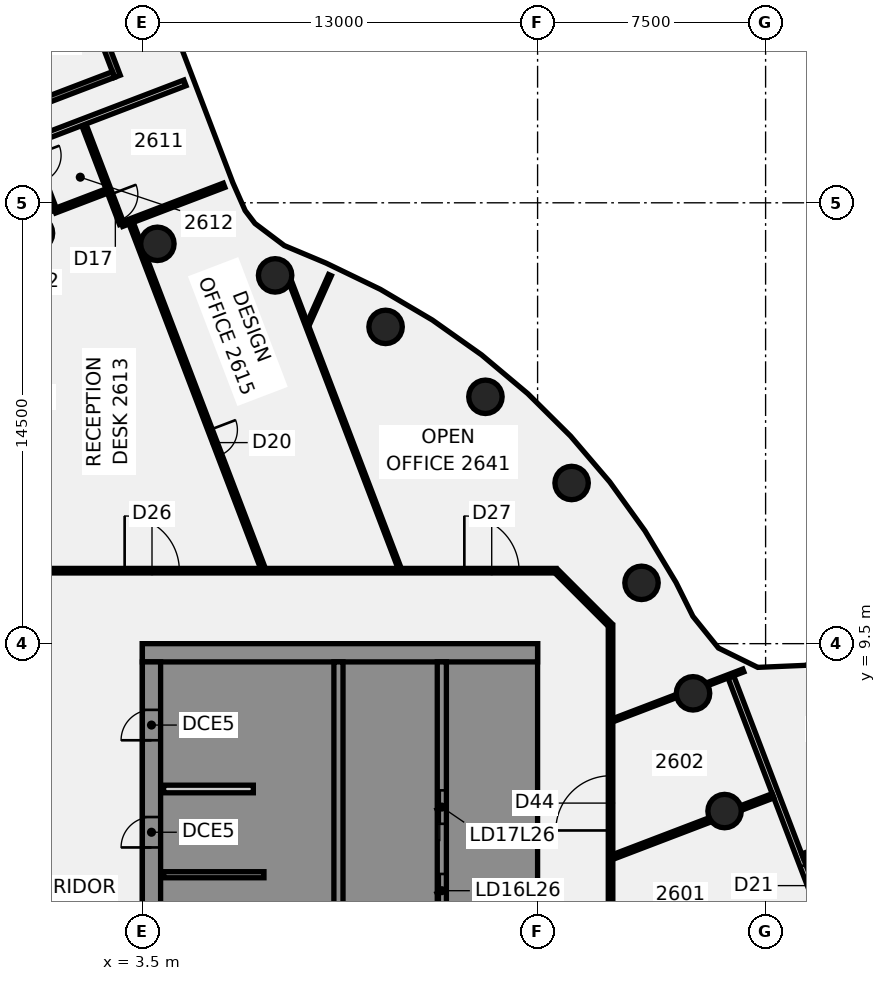
"""IFC4 building model, lengths in metres.
Left out: names, types, materials, properties, quantities, classifications, styles, units other than length and angle.
Written with IfcOpenShell. Run it as: python <this file> out.ifc"""

import sys

from ifc_helpers import new_model, si_unit, direction, frame, frame_2d, origin, origin_2d, place, context, subcontext, project, spatial, polyline, rectangle, circle, outline, extrude, element, fill, save


model = new_model("IFC4")
c1 = context("Model", 3, precision=1e-05, world=origin(), true_north=direction((0.0, 1.0)))
c2 = subcontext(c1, "Body", "Model", "MODEL_VIEW")
j1 = project(units=[si_unit("LENGTHUNIT", "METRE"), si_unit("PLANEANGLEUNIT", "RADIAN")], contexts=[c1])
p1 = place(None, origin())
s1 = spatial("IfcSite", under=j1, at=p1, CompositionType="ELEMENT")
p2 = place(p1, origin())
s2 = spatial("IfcBuilding", under=s1, at=p2, CompositionType="ELEMENT")
p3 = place(p2, frame((0.0, 0.0, 109.75)))
s3 = spatial("IfcBuildingStorey", under=s2, at=p3, CompositionType="ELEMENT", Elevation=109.75)
for number, where, z_axis, x_axis in (
    (1, (22.651, 3.994, -0.14), (0.0, 0.0, 1.0), (1.0, 0.0, 0.0)),
    (2, (21.613, 7.866, -0.14), (0.0, 0.0, 1.0), (1.0, 0.0, 0.0)),
    (3, (19.919, 11.5, -0.14), (0.0, 0.0, 1.0), (1.0, 0.0, 0.0)),
    (4, (17.619, 14.784, -0.14), (0.0, 0.0, 1.0), (1.0, 0.0, 0.0)),
    (5, (14.784, 17.619, -0.14), (0.0, 0.0, 1.0), (1.0, 0.0, 0.0)),
    (6, (11.5, 19.919, -0.14), (0.0, 0.0, 1.0), (1.0, 0.0, 0.0)),
    (7, (7.866, 21.613, -0.14), (0.0, 0.0, 1.0), (1.0, 0.0, 0.0)),
    (8, (3.994, 22.651, -0.14), (0.0, 0.0, 1.0), (1.0, 0.0, 0.0)),
    (9, (0.0, 23.0, -0.14), (0.0, 0.0, 1.0), (1.0, 0.0, 0.0)),
):
    element("IfcColumn", number, at=place(p3, frame(where, z_axis=z_axis, x_axis=x_axis)), inside=s3, PredefinedType="COLUMN", context=c2, shape_type="SweptSolid", body=[
        extrude(circle(Radius=0.55, at=origin_2d()), origin(), (0.0, 0.0, 1.0), 3.75),
    ])
p4 = place(p3, frame((-0.576, 26.875, 0.0), z_axis=(0.0, 0.0, 1.0), x_axis=(0.356621516602, -0.934248946425, 0.0)))
e10 = element("IfcWall", 10, at=p4, inside=s3, PredefinedType="PARTITIONING", context=c2, shape_type="SweptSolid", body=[
    extrude(rectangle(XDim=3.339, YDim=0.15, at=frame_2d((1.67, 0.0))), origin(), (0.0, 0.0, 1.0), 3.01),
])
p5 = place(p4, frame((1.409, 0.0, 0.0)))
e11 = element("IfcOpeningElement", 11, at=p5, cuts=e10, PredefinedType="OPENING", context=c2, shape_type="SweptSolid", body=[
    extrude(rectangle(XDim=0.9, YDim=2.1, at=frame_2d((0.45, 1.05))), frame((0.0, 0.085, 0.0), z_axis=(0.0, -1.0, 0.0), x_axis=(1.0, 0.0, 0.0)), (0.0, 0.0, 1.0), 0.17),
])
p6 = place(p3, frame((1.577, 26.562, 0.0), z_axis=(0.0, 0.0, 1.0), x_axis=(0.356707132487, -0.934216260634, 0.0)))
e12 = element("IfcWall", 12, at=p6, inside=s3, PredefinedType="PARTITIONING", context=c2, shape_type="SweptSolid", body=[
    extrude(rectangle(XDim=3.48, YDim=0.15, at=frame_2d((1.74, 0.0))), origin(), (0.0, 0.0, 1.0), 3.01),
])
p7 = place(p6, frame((2.45, 0.0, 0.0)))
e13 = element("IfcOpeningElement", 13, at=p7, cuts=e12, PredefinedType="OPENING", context=c2, shape_type="SweptSolid", body=[
    extrude(rectangle(XDim=0.9, YDim=2.1, at=frame_2d((0.45, 1.05))), frame((0.0, 0.085, 0.0), z_axis=(0.0, -1.0, 0.0), x_axis=(1.0, 0.0, 0.0)), (0.0, 0.0, 1.0), 0.17),
])
p8 = place(p3, frame((3.134, 23.325, 0.0), z_axis=(0.0, 0.0, 1.0), x_axis=(0.356638375278, -0.934242510957, 0.0)))
e14 = element("IfcWall", 14, at=p8, inside=s3, PredefinedType="PARTITIONING", context=c2, shape_type="SweptSolid", body=[
    extrude(rectangle(XDim=12.139, YDim=0.15, at=frame_2d((6.07, 0.0))), origin(), (0.0, 0.0, 1.0), 3.01),
])
p9 = place(p8, frame((7.27, 0.0, 0.0)))
e15 = element("IfcOpeningElement", 15, at=p9, cuts=e14, PredefinedType="OPENING", context=c2, shape_type="SweptSolid", body=[
    extrude(rectangle(XDim=0.9, YDim=2.1, at=frame_2d((0.45, 1.05))), frame((0.0, 0.085, 0.0), z_axis=(0.0, -1.0, 0.0), x_axis=(1.0, 0.0, 0.0)), (0.0, 0.0, 1.0), 0.17),
])
p10 = place(p3, frame((8.367, 21.392, 0.0), z_axis=(0.0, 0.0, 1.0), x_axis=(0.356653909122, -0.934236580909, 0.0)))
e16 = element("IfcWall", 16, at=p10, inside=s3, PredefinedType="PARTITIONING", context=c2, shape_type="SweptSolid", body=[
    extrude(rectangle(XDim=10.08, YDim=0.1, at=frame_2d((5.04, 0.0))), origin(), (0.0, 0.0, 1.0), 3.01),
])
p11 = place(p3, frame((22.857, 8.408, 0.0), z_axis=(0.0, 0.0, 1.0), x_axis=(0.356739087103, -0.934204058936, 0.0)))
e17 = element("IfcWall", 17, at=p11, inside=s3, PredefinedType="PARTITIONING", context=c2, shape_type="SweptSolid", body=[
    extrude(rectangle(XDim=14.249, YDim=0.2, at=frame_2d((7.124, 0.0))), origin(), (0.0, 0.0, 1.0), 3.01),
])
p12 = place(p11, frame((6.65, 0.0, 0.0)))
e18 = element("IfcOpeningElement", 18, at=p12, cuts=e17, PredefinedType="OPENING", context=c2, shape_type="SweptSolid", body=[
    extrude(rectangle(XDim=1.4, YDim=2.1, at=frame_2d((0.7, 1.05))), frame((0.0, 0.11, 0.0), z_axis=(0.0, -1.0, 0.0), x_axis=(1.0, 0.0, 0.0)), (0.0, 0.0, 1.0), 0.22),
])
p13 = place(p3, frame((17.128, 11.872, 0.0), z_axis=(0.0, 0.0, 1.0), x_axis=(0.707106781187, -0.707106781187, 0.0)))
e19 = element("IfcWall", 19, at=p13, inside=s3, PredefinedType="PARTITIONING", context=c2, shape_type="SweptSolid", body=[
    extrude(rectangle(XDim=2.465, YDim=0.15, at=frame_2d((1.232, 0.0))), origin(), (0.0, 0.0, 1.0), 3.01),
])
p14 = place(p3, frame((-17.065, 11.9, 0.0), z_axis=(0.0, 0.0, 1.0), x_axis=(1.0, 0.0, 0.0)))
e20 = element("IfcWall", 20, at=p14, inside=s3, PredefinedType="PARTITIONING", context=c2, shape_type="SweptSolid", body=[
    extrude(rectangle(XDim=34.165, YDim=0.15, at=frame_2d((17.083, 0.0))), origin(), (0.0, 0.0, 1.0), 3.01),
])
p15 = place(p14, frame((19.982, 0.0, 0.0)))
e21 = element("IfcOpeningElement", 21, at=p15, cuts=e20, PredefinedType="OPENING", context=c2, shape_type="SweptSolid", body=[
    extrude(rectangle(XDim=1.8, YDim=2.1, at=frame_2d((0.9, 1.05))), frame((0.0, 0.085, 0.0), z_axis=(0.0, -1.0, 0.0), x_axis=(1.0, 0.0, 0.0)), (0.0, 0.0, 1.0), 0.17),
])
p16 = place(p14, frame((31.156, 0.0, 0.0)))
e22 = element("IfcOpeningElement", 22, at=p16, cuts=e20, PredefinedType="OPENING", context=c2, shape_type="SweptSolid", body=[
    extrude(rectangle(XDim=1.8, YDim=2.1, at=frame_2d((0.9, 1.05))), frame((0.0, 0.085, 0.0), z_axis=(0.0, -1.0, 0.0), x_axis=(1.0, 0.0, 0.0)), (0.0, 0.0, 1.0), 0.17),
])
p17 = place(p14, frame((5.515, 0.0, 0.0)))
e23 = element("IfcOpeningElement", 23, at=p17, cuts=e20, PredefinedType="OPENING", context=c2, shape_type="SweptSolid", body=[
    extrude(rectangle(XDim=1.8, YDim=2.1, at=frame_2d((0.9, 1.05))), frame((0.0, 0.085, 0.0), z_axis=(0.0, -1.0, 0.0), x_axis=(1.0, 0.0, 0.0)), (0.0, 0.0, 1.0), 0.17),
])
p18 = place(p3, frame((-8.408, 22.857, 0.0), z_axis=(0.0, 0.0, 1.0), x_axis=(0.934093855928, 0.357027545601, 0.0)))
e24 = element("IfcWall", 24, at=p18, inside=s3, PredefinedType="PARTITIONING", context=c2, shape_type="SweptSolid", body=[
    extrude(rectangle(XDim=14.249, YDim=0.2, at=frame_2d((7.124, 0.0))), origin(), (0.0, 0.0, 1.0), 3.01),
])
p19 = place(p18, frame((6.65, 0.0, 0.0)))
e25 = element("IfcOpeningElement", 25, at=p19, cuts=e24, PredefinedType="OPENING", context=c2, shape_type="SweptSolid", body=[
    extrude(rectangle(XDim=1.4, YDim=2.1, at=frame_2d((0.7, 1.05))), frame((0.0, 0.11, 0.0), z_axis=(0.0, -1.0, 0.0), x_axis=(1.0, 0.0, 0.0)), (0.0, 0.0, 1.0), 0.22),
])
p20 = place(p3, frame((2.825, 23.292, 0.0), z_axis=(0.0, 0.0, 1.0), x_axis=(0.93426400511, 0.356582064546, 0.0)))
e26 = element("IfcWall", 26, at=p20, inside=s3, PredefinedType="PARTITIONING", context=c2, shape_type="SweptSolid", body=[
    extrude(rectangle(XDim=3.599, YDim=0.15, at=frame_2d((1.799, 0.0))), origin(), (0.0, 0.0, 1.0), 3.01),
])
p21 = place(p3, frame((0.622, 23.735, 0.0), z_axis=(0.0, 0.0, 1.0), x_axis=(0.934290504137, 0.356512627939, 0.0)))
e27 = element("IfcWall", 27, at=p21, inside=s3, PredefinedType="PARTITIONING", context=c2, shape_type="SweptSolid", body=[
    extrude(rectangle(XDim=1.825, YDim=0.15, at=frame_2d((0.913, 0.0))), origin(), (0.0, 0.0, 1.0), 3.01),
])
p22 = place(p3, frame((18.984, 2.488, 0.0), z_axis=(0.0, 0.0, 1.0), x_axis=(0.934220119269, 0.356697026555, 0.0)))
e28 = element("IfcWall", 28, at=p22, inside=s3, PredefinedType="PARTITIONING", context=c2, shape_type="SweptSolid", body=[
    extrude(rectangle(XDim=3.414, YDim=0.15, at=frame_2d((1.707, 0.0))), origin(), (0.0, 0.0, 1.0), 3.01),
])
p23 = place(p3, frame((23.184, 4.092, 0.0), z_axis=(0.0, 0.0, 1.0), x_axis=(0.934197512786, 0.356756229243, 0.0)))
e29 = element("IfcWall", 29, at=p23, inside=s3, PredefinedType="PARTITIONING", context=c2, shape_type="SweptSolid", body=[
    extrude(rectangle(XDim=1.134, YDim=0.15, at=frame_2d((0.567, 0.0))), origin(), (0.0, 0.0, 1.0), 3.01),
])
p24 = place(p3, frame((18.975, 6.98, 0.0), z_axis=(0.0, 0.0, 1.0), x_axis=(0.934310454928, 0.356460339748, 0.0)))
e30 = element("IfcWall", 30, at=p24, inside=s3, PredefinedType="PARTITIONING", context=c2, shape_type="SweptSolid", body=[
    extrude(rectangle(XDim=2.249, YDim=0.1, at=frame_2d((1.124, 0.0))), origin(), (0.0, 0.0, 1.0), 3.01),
])
p25 = place(p3, frame((22.079, 8.165, 0.0), z_axis=(0.0, 0.0, 1.0), x_axis=(0.9342532872, 0.356610144775, 0.0)))
e31 = element("IfcWall", 31, at=p25, inside=s3, PredefinedType="PARTITIONING", context=c2, shape_type="SweptSolid", body=[
    extrude(rectangle(XDim=1.271, YDim=0.1, at=frame_2d((0.636, 0.0))), origin(), (0.0, 0.0, 1.0), 3.01),
])
p26 = place(p3, frame((25.22, 2.513, 0.0), z_axis=(0.0, 0.0, 1.0), x_axis=(0.934230964204, 0.356668621445, 0.0)))
e32 = element("IfcWall", 32, at=p26, inside=s3, PredefinedType="PARTITIONING", context=c2, shape_type="SweptSolid", body=[
    extrude(rectangle(XDim=8.82, YDim=0.15, at=frame_2d((4.41, 0.0))), origin(), (0.0, 0.0, 1.0), 3.01),
])
p27 = place(p26, frame((6.045, 0.0, 0.0)))
e33 = element("IfcOpeningElement", 33, at=p27, cuts=e32, PredefinedType="OPENING", context=c2, shape_type="SweptSolid", body=[
    extrude(rectangle(XDim=1.8, YDim=2.1, at=frame_2d((0.9, 1.05))), frame((0.0, 0.085, 0.0), z_axis=(0.0, -1.0, 0.0), x_axis=(1.0, 0.0, 0.0)), (0.0, 0.0, 1.0), 0.17),
])
p28 = place(p26, frame((0.945, 0.0, 0.0)))
e34 = element("IfcOpeningElement", 34, at=p28, cuts=e32, PredefinedType="OPENING", context=c2, shape_type="SweptSolid", body=[
    extrude(rectangle(XDim=1.8, YDim=2.1, at=frame_2d((0.9, 1.05))), frame((0.0, 0.085, 0.0), z_axis=(0.0, -1.0, 0.0), x_axis=(1.0, 0.0, 0.0)), (0.0, 0.0, 1.0), 0.17),
])
p29 = place(p3, frame((8.963, 20.036, 0.0), z_axis=(0.0, 0.0, 1.0), x_axis=(0.408251922196, 0.912869305007, 0.0)))
e35 = element("IfcWall", 35, at=p29, inside=s3, PredefinedType="PARTITIONING", context=c2, shape_type="SweptSolid", body=[
    extrude(rectangle(XDim=1.735, YDim=0.1, at=frame_2d((0.868, 0.0))), origin(), (0.0, 0.0, 1.0), 3.01),
])
p30 = place(p3, frame((18.9, -10.1, 0.0), z_axis=(0.0, 0.0, 1.0), x_axis=(0.0, 1.0, 0.0)))
e36 = element("IfcWall", 36, at=p30, inside=s3, PredefinedType="PARTITIONING", context=c2, shape_type="SweptSolid", body=[
    extrude(rectangle(XDim=20.2, YDim=0.15, at=frame_2d((10.1, 0.0))), origin(), (0.0, 0.0, 1.0), 3.01),
])
p31 = place(p30, frame((8.877, 0.0, 0.0)))
e37 = element("IfcOpeningElement", 37, at=p31, cuts=e36, PredefinedType="OPENING", context=c2, shape_type="SweptSolid", body=[
    extrude(rectangle(XDim=1.8, YDim=2.1, at=frame_2d((0.9, 1.05))), frame((0.0, 0.085, 0.0), z_axis=(0.0, -1.0, 0.0), x_axis=(1.0, 0.0, 0.0)), (0.0, 0.0, 1.0), 0.17),
])
p32 = place(p30, frame((13.456, 0.0, 0.0)))
e38 = element("IfcOpeningElement", 38, at=p32, cuts=e36, PredefinedType="OPENING", context=c2, shape_type="SweptSolid", body=[
    extrude(rectangle(XDim=1.8, YDim=2.1, at=frame_2d((0.9, 1.05))), frame((0.0, 0.085, 0.0), z_axis=(0.0, -1.0, 0.0), x_axis=(1.0, 0.0, 0.0)), (0.0, 0.0, 1.0), 0.17),
])
p33 = place(p3, origin())
e39 = element("IfcWall", 39, at=p33, inside=s3, PredefinedType="SHEAR", context=c2, shape_type="SweptSolid", body=[
    extrude(outline(polyline([(13.5, -8.9), (15.9, -8.9), (16.5, -8.9), (16.5, 8.9), (15.9, 8.9), (13.5, 8.9), (13.5, 8.125), (15.9, 8.125), (15.9, 5.625), (13.5, 5.625), (13.5, 5.375), (15.9, 5.375), (15.9, 2.875), (13.5, 2.875), (13.5, 2.625), (15.9, 2.625), (15.9, 0.125), (13.5, 0.125), (13.5, -0.125), (15.9, -0.125), (15.9, -2.625), (13.5, -2.625), (13.5, -2.875), (15.9, -2.875), (15.9, -5.375), (13.5, -5.375), (13.5, -5.625), (15.9, -5.625), (15.9, -8.125), (13.5, -8.125), (13.5, -8.9)])), origin(), (0.0, 0.0, 1.0), 3.61),
])
p34 = place(p3, frame((16.5, 9.2, 0.0), z_axis=(0.0, 0.0, 1.0), x_axis=(-1.0, 0.0, 0.0)))
e40 = element("IfcWall", 40, at=p34, inside=s3, PredefinedType="SHEAR", context=c2, shape_type="SweptSolid", body=[
    extrude(rectangle(XDim=13.0, YDim=0.6, at=frame_2d((6.5, 0.0))), origin(), (0.0, 0.0, 1.0), 3.61),
])
p35 = place(p3, origin())
e41 = element("IfcWall", 41, at=p35, inside=s3, PredefinedType="SHEAR", context=c2, shape_type="SweptSolid", body=[
    extrude(outline(polyline([(9.8, -5.375), (7.5, -5.375), (7.5, -2.875), (9.8, -2.875), (9.8, -2.625), (7.5, -2.625), (7.5, -0.125), (9.8, -0.125), (9.8, 0.125), (7.5, 0.125), (7.5, 2.625), (9.8, 2.625), (9.8, 2.875), (7.5, 2.875), (7.5, 5.375), (9.8, 5.375), (9.8, 5.625), (7.5, 5.625), (7.5, 8.125), (9.8, 8.125), (9.8, 8.9), (7.5, 8.9), (7.2, 8.9), (7.2, -5.625), (7.5, -5.625), (9.8, -5.625), (9.8, -5.375)])), origin(), (0.0, 0.0, 1.0), 3.61),
])
p36 = place(p3, frame((7.5, 1.9, 0.0), z_axis=(0.0, 0.0, 1.0), x_axis=(-1.0, 0.0, 0.0)))
e42 = element("IfcWall", 42, at=p36, inside=s3, PredefinedType="SHEAR", context=c2, shape_type="SweptSolid", body=[
    extrude(rectangle(XDim=3.3, YDim=0.2, at=frame_2d((1.65, 0.0))), origin(), (0.0, 0.0, 1.0), 3.61),
])
p37 = place(p3, frame((13.35, -8.9, 0.0), z_axis=(0.0, 0.0, 1.0), x_axis=(0.0, 1.0, 0.0)))
e43 = element("IfcWall", 43, at=p37, inside=s3, PredefinedType="SHEAR", context=c2, shape_type="SweptSolid", body=[
    extrude(rectangle(XDim=17.8, YDim=0.3, at=frame_2d((8.9, 0.0))), origin(), (0.0, 0.0, 1.0), 3.61),
])
p38 = place(p37, frame((1.325, 0.0, 0.0)))
e44 = element("IfcOpeningElement", 44, at=p38, cuts=e43, PredefinedType="OPENING", context=c2, shape_type="SweptSolid", body=[
    extrude(rectangle(XDim=1.4, YDim=2.1, at=frame_2d((0.7, 1.05))), frame((0.0, 0.16, 0.0), z_axis=(0.0, -1.0, 0.0), x_axis=(1.0, 0.0, 0.0)), (0.0, 0.0, 1.0), 0.32),
])
p39 = place(p37, frame((4.225, 0.0, 0.0)))
e45 = element("IfcOpeningElement", 45, at=p39, cuts=e43, PredefinedType="OPENING", context=c2, shape_type="SweptSolid", body=[
    extrude(rectangle(XDim=1.1, YDim=2.1, at=frame_2d((0.55, 1.05))), frame((0.0, 0.16, 0.0), z_axis=(0.0, -1.0, 0.0), x_axis=(1.0, 0.0, 0.0)), (0.0, 0.0, 1.0), 0.32),
])
p40 = place(p37, frame((6.975, 0.0, 0.0)))
e46 = element("IfcOpeningElement", 46, at=p40, cuts=e43, PredefinedType="OPENING", context=c2, shape_type="SweptSolid", body=[
    extrude(rectangle(XDim=1.1, YDim=2.1, at=frame_2d((0.55, 1.05))), frame((0.0, 0.16, 0.0), z_axis=(0.0, -1.0, 0.0), x_axis=(1.0, 0.0, 0.0)), (0.0, 0.0, 1.0), 0.32),
])
p41 = place(p37, frame((9.725, 0.0, 0.0)))
e47 = element("IfcOpeningElement", 47, at=p41, cuts=e43, PredefinedType="OPENING", context=c2, shape_type="SweptSolid", body=[
    extrude(rectangle(XDim=1.1, YDim=2.1, at=frame_2d((0.55, 1.05))), frame((0.0, 0.16, 0.0), z_axis=(0.0, -1.0, 0.0), x_axis=(1.0, 0.0, 0.0)), (0.0, 0.0, 1.0), 0.32),
])
p42 = place(p37, frame((12.475, 0.0, 0.0)))
e48 = element("IfcOpeningElement", 48, at=p42, cuts=e43, PredefinedType="OPENING", context=c2, shape_type="SweptSolid", body=[
    extrude(rectangle(XDim=1.1, YDim=2.1, at=frame_2d((0.55, 1.05))), frame((0.0, 0.16, 0.0), z_axis=(0.0, -1.0, 0.0), x_axis=(1.0, 0.0, 0.0)), (0.0, 0.0, 1.0), 0.32),
])
p43 = place(p3, frame((9.95, -8.9, 0.0), z_axis=(0.0, 0.0, 1.0), x_axis=(0.0, 1.0, 0.0)))
e49 = element("IfcWall", 49, at=p43, inside=s3, PredefinedType="SHEAR", context=c2, shape_type="SweptSolid", body=[
    extrude(rectangle(XDim=17.8, YDim=0.3, at=frame_2d((8.9, 0.0))), origin(), (0.0, 0.0, 1.0), 3.61),
])
p44 = place(p3, frame((3.8, -8.9, 0.0), z_axis=(0.0, 0.0, 1.0), x_axis=(0.0, 1.0, 0.0)))
e50 = element("IfcWall", 50, at=p44, inside=s3, PredefinedType="SHEAR", context=c2, shape_type="SweptSolid", body=[
    extrude(rectangle(XDim=17.8, YDim=0.6, at=frame_2d((8.9, 0.0))), origin(), (0.0, 0.0, 1.0), 3.61),
])
p45 = place(p44, frame((1.25, 0.0, 0.0)))
e51 = element("IfcOpeningElement", 51, at=p45, cuts=e50, PredefinedType="OPENING", context=c2, shape_type="SweptSolid", body=[
    extrude(rectangle(XDim=1.8, YDim=2.1, at=frame_2d((0.9, 1.05))), frame((0.0, 0.31, 0.0), z_axis=(0.0, -1.0, 0.0), x_axis=(1.0, 0.0, 0.0)), (0.0, 0.0, 1.0), 0.62),
])
p46 = place(p44, frame((11.698, 0.0, 0.0)))
e52 = element("IfcOpeningElement", 52, at=p46, cuts=e50, PredefinedType="OPENING", context=c2, shape_type="SweptSolid", body=[
    extrude(rectangle(XDim=1.0, YDim=2.1, at=frame_2d((0.5, 1.05))), frame((0.0, 0.31, 0.0), z_axis=(0.0, -1.0, 0.0), x_axis=(1.0, 0.0, 0.0)), (0.0, 0.0, 1.0), 0.62),
])
p47 = place(p44, frame((15.222, 0.0, 0.0)))
e53 = element("IfcOpeningElement", 53, at=p47, cuts=e50, PredefinedType="OPENING", context=c2, shape_type="SweptSolid", body=[
    extrude(rectangle(XDim=1.0, YDim=2.1, at=frame_2d((0.5, 1.05))), frame((0.0, 0.31, 0.0), z_axis=(0.0, -1.0, 0.0), x_axis=(1.0, 0.0, 0.0)), (0.0, 0.0, 1.0), 0.62),
])
p48 = place(p3, frame((7.15, 4.72, 0.0), z_axis=(0.0, 0.0, 1.0), x_axis=(-1.0, 0.0, 0.0)))
e54 = element("IfcWall", 54, at=p48, inside=s3, PredefinedType="PARTITIONING", context=c2, shape_type="SweptSolid", body=[
    extrude(rectangle(XDim=2.95, YDim=0.25, at=frame_2d((1.475, 0.0))), origin(), (0.0, 0.0, 1.0), 3.61),
])
p49 = place(p3, frame((2.679, 28.161, -0.14), z_axis=(0.0, 0.0, 1.0), x_axis=(-0.356668027774, 0.934231190854, 0.0)))
e55 = element("IfcWall", 55, at=p49, inside=s3, PredefinedType="SHEAR", context=c2, shape_type="SweptSolid", body=[
    extrude(rectangle(XDim=6.7, YDim=0.2, at=frame_2d((3.35, 0.0))), origin(), (0.0, 0.0, 1.0), 3.15),
])
p50 = place(p3, frame((2.55, 28.219, -0.14), z_axis=(0.0, 0.0, 1.0), x_axis=(-0.93422763103, -0.356677351986, 0.0)))
e56 = element("IfcWall", 56, at=p50, inside=s3, PredefinedType="SHEAR", context=c2, shape_type="SweptSolid", body=[
    extrude(rectangle(XDim=3.2, YDim=0.2, at=frame_2d((1.6, 0.0))), origin(), (0.0, 0.0, 1.0), 3.15),
])
p51 = place(p7, origin())
e57 = element("IfcDoor", 57, at=p51, inside=s3, OperationType="SINGLE_SWING_LEFT", PredefinedType="DOOR", context=c2, shape_type="SweptSolid", body=[
    extrude(rectangle(XDim=0.9, YDim=2.1, at=frame_2d((0.45, 1.05))), frame((0.0, 0.025, 0.0), z_axis=(0.0, -1.0, 0.0), x_axis=(1.0, 0.0, 0.0)), (0.0, 0.0, 1.0), 0.05),
])
fill(e13, e57)
p52 = place(p9, origin())
e58 = element("IfcDoor", 58, at=p52, inside=s3, OperationType="SINGLE_SWING_LEFT", PredefinedType="DOOR", context=c2, shape_type="SweptSolid", body=[
    extrude(rectangle(XDim=0.9, YDim=2.1, at=frame_2d((0.45, 1.05))), frame((0.0, 0.025, 0.0), z_axis=(0.0, -1.0, 0.0), x_axis=(1.0, 0.0, 0.0)), (0.0, 0.0, 1.0), 0.05),
])
fill(e15, e58)
p53 = place(p12, frame((1.4, 0.0, 0.0), z_axis=(0.0, 0.0, 1.0), x_axis=(-1.0, 0.0, 0.0)))
e59 = element("IfcDoor", 59, at=p53, inside=s3, OperationType="DOUBLE_DOOR_SINGLE_SWING", PredefinedType="DOOR", context=c2, shape_type="SweptSolid", body=[
    extrude(rectangle(XDim=1.4, YDim=2.1, at=frame_2d((0.7, 1.05))), frame((0.0, 0.025, 0.0), z_axis=(0.0, -1.0, 0.0), x_axis=(1.0, 0.0, 0.0)), (0.0, 0.0, 1.0), 0.05),
])
fill(e18, e59)
p54 = place(p15, frame((1.8, 0.0, 0.0), z_axis=(0.0, 0.0, 1.0), x_axis=(-1.0, 0.0, 0.0)))
e60 = element("IfcDoor", 60, at=p54, inside=s3, OperationType="DOUBLE_DOOR_SINGLE_SWING", PredefinedType="DOOR", context=c2, shape_type="SweptSolid", body=[
    extrude(rectangle(XDim=1.8, YDim=2.1, at=frame_2d((0.9, 1.05))), frame((0.0, 0.025, 0.0), z_axis=(0.0, -1.0, 0.0), x_axis=(1.0, 0.0, 0.0)), (0.0, 0.0, 1.0), 0.05),
])
fill(e21, e60)
p55 = place(p16, origin())
e61 = element("IfcDoor", 61, at=p55, inside=s3, OperationType="DOUBLE_DOOR_SINGLE_SWING", PredefinedType="DOOR", context=c2, shape_type="SweptSolid", body=[
    extrude(rectangle(XDim=1.8, YDim=2.1, at=frame_2d((0.9, 1.05))), frame((0.0, 0.025, 0.0), z_axis=(0.0, -1.0, 0.0), x_axis=(1.0, 0.0, 0.0)), (0.0, 0.0, 1.0), 0.05),
])
fill(e22, e61)
p56 = place(p32, frame((1.8, 0.0, 0.0), z_axis=(0.0, 0.0, 1.0), x_axis=(-1.0, 0.0, 0.0)))
e62 = element("IfcDoor", 62, at=p56, inside=s3, OperationType="DOUBLE_DOOR_SINGLE_SWING", PredefinedType="DOOR", context=c2, shape_type="SweptSolid", body=[
    extrude(rectangle(XDim=1.8, YDim=2.1, at=frame_2d((0.9, 1.05))), frame((0.0, 0.025, 0.0), z_axis=(0.0, -1.0, 0.0), x_axis=(1.0, 0.0, 0.0)), (0.0, 0.0, 1.0), 0.05),
])
fill(e38, e62)
p57 = place(p46, origin())
e63 = element("IfcDoor", 63, at=p57, inside=s3, OperationType="SINGLE_SWING_LEFT", PredefinedType="DOOR", context=c2, shape_type="SweptSolid", body=[
    extrude(rectangle(XDim=1.0, YDim=2.1, at=frame_2d((0.5, 1.05))), frame((0.0, -0.225, 0.0), z_axis=(0.0, -1.0, 0.0), x_axis=(1.0, 0.0, 0.0)), (0.0, 0.0, 1.0), 0.05),
])
fill(e52, e63)
p58 = place(p47, origin())
e64 = element("IfcDoor", 64, at=p58, inside=s3, OperationType="SINGLE_SWING_LEFT", PredefinedType="DOOR", context=c2, shape_type="SweptSolid", body=[
    extrude(rectangle(XDim=1.0, YDim=2.1, at=frame_2d((0.5, 1.05))), frame((0.0, -0.225, 0.0), z_axis=(0.0, -1.0, 0.0), x_axis=(1.0, 0.0, 0.0)), (0.0, 0.0, 1.0), 0.05),
])
fill(e53, e64)
p59 = place(p41, origin())
e65 = element("IfcDoor", 65, at=p59, inside=s3, OperationType="SLIDING_TO_LEFT", PredefinedType="DOOR", context=c2, shape_type="SweptSolid", body=[
    extrude(rectangle(XDim=1.1, YDim=2.1, at=frame_2d((0.55, 1.05))), frame((0.0, 0.025, 0.0), z_axis=(0.0, -1.0, 0.0), x_axis=(1.0, 0.0, 0.0)), (0.0, 0.0, 1.0), 0.05),
])
fill(e47, e65)
p60 = place(p42, origin())
e66 = element("IfcDoor", 66, at=p60, inside=s3, OperationType="SLIDING_TO_LEFT", PredefinedType="DOOR", context=c2, shape_type="SweptSolid", body=[
    extrude(rectangle(XDim=1.1, YDim=2.1, at=frame_2d((0.55, 1.05))), frame((0.0, 0.025, 0.0), z_axis=(0.0, -1.0, 0.0), x_axis=(1.0, 0.0, 0.0)), (0.0, 0.0, 1.0), 0.05),
])
fill(e48, e66)
save(model, sys.argv[1])
